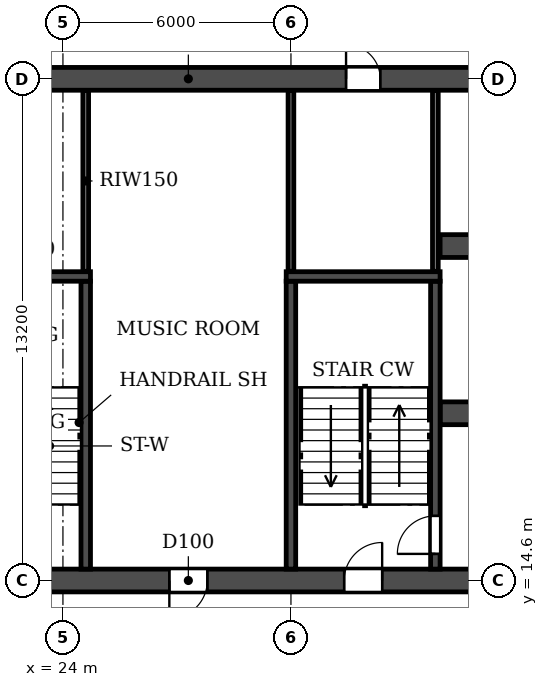
"""IFC4 building model, lengths in metres.
Left out: names, types, materials, properties, quantities, classifications, styles, units other than length and angle.
Written with IfcOpenShell. Run it as: python <this file> out.ifc"""

import sys

from ifc_helpers import new_model, si_unit, direction, frame, frame_2d, origin, place, context, subcontext, project, spatial, rectangle, extrude, element, fill, save


model = new_model("IFC4")
c1 = context("Model", 3, precision=1e-05, world=origin(), true_north=direction((0.0, 1.0)))
c2 = subcontext(c1, "Body", "Model", "MODEL_VIEW")
j1 = project(units=[si_unit("LENGTHUNIT", "METRE"), si_unit("PLANEANGLEUNIT", "RADIAN")], contexts=[c1])
p1 = place(None, origin())
s1 = spatial("IfcSite", under=j1, at=p1, CompositionType="ELEMENT")
p2 = place(p1, origin())
s2 = spatial("IfcBuilding", under=s1, at=p2, CompositionType="ELEMENT")
p3 = place(p2, frame((0.0, 0.0, 56.4)))
s3 = spatial("IfcBuildingStorey", under=s2, at=p3, CompositionType="ELEMENT", Elevation=56.4)
p4 = place(p3, frame((8.6, 14.6, 0.0), z_axis=(0.0, 0.0, 1.0), x_axis=(1.0, 0.0, 0.0)))
e1 = element("IfcWall", 1, at=p4, inside=s3, PredefinedType="SOLIDWALL", context=c2, shape_type="SweptSolid", body=[
    extrude(rectangle(XDim=84.8, YDim=0.6, at=frame_2d((42.4, 0.0))), origin(), (0.0, 0.0, 1.0), 3.05),
])
p5 = place(p4, frame((1.35, 0.0, 0.0)))
e2 = element("IfcOpeningElement", 2, at=p5, cuts=e1, PredefinedType="OPENING", context=c2, shape_type="SweptSolid", body=[
    extrude(rectangle(XDim=1.0, YDim=2.1, at=frame_2d((0.5, 1.05))), frame((0.0, 0.31, 0.0), z_axis=(0.0, -1.0, 0.0), x_axis=(1.0, 0.0, 0.0)), (0.0, 0.0, 1.0), 0.62),
])
p6 = place(p4, frame((6.05, 0.0, 0.0)))
e3 = element("IfcOpeningElement", 3, at=p6, cuts=e1, PredefinedType="OPENING", context=c2, shape_type="SweptSolid", body=[
    extrude(rectangle(XDim=1.0, YDim=2.1, at=frame_2d((0.5, 1.05))), frame((0.0, 0.31, 0.0), z_axis=(0.0, -1.0, 0.0), x_axis=(1.0, 0.0, 0.0)), (0.0, 0.0, 1.0), 0.62),
])
p7 = place(p4, frame((10.3, 0.0, 0.0)))
e4 = element("IfcOpeningElement", 4, at=p7, cuts=e1, PredefinedType="OPENING", context=c2, shape_type="SweptSolid", body=[
    extrude(rectangle(XDim=1.0, YDim=2.1, at=frame_2d((0.5, 1.05))), frame((0.0, 0.31, 0.0), z_axis=(0.0, -1.0, 0.0), x_axis=(1.0, 0.0, 0.0)), (0.0, 0.0, 1.0), 0.62),
])
p8 = place(p4, frame((18.2, 0.0, 0.0)))
e5 = element("IfcOpeningElement", 5, at=p8, cuts=e1, PredefinedType="OPENING", context=c2, shape_type="SweptSolid", body=[
    extrude(rectangle(XDim=1.0, YDim=2.1, at=frame_2d((0.5, 1.05))), frame((0.0, 0.31, 0.0), z_axis=(0.0, -1.0, 0.0), x_axis=(1.0, 0.0, 0.0)), (0.0, 0.0, 1.0), 0.62),
])
p9 = place(p4, frame((22.8, 0.0, 0.0)))
e6 = element("IfcOpeningElement", 6, at=p9, cuts=e1, PredefinedType="OPENING", context=c2, shape_type="SweptSolid", body=[
    extrude(rectangle(XDim=1.0, YDim=2.1, at=frame_2d((0.5, 1.05))), frame((0.0, 0.31, 0.0), z_axis=(0.0, -1.0, 0.0), x_axis=(1.0, 0.0, 0.0)), (0.0, 0.0, 1.0), 0.62),
])
p10 = place(p4, frame((35.4, 0.0, 0.0)))
e7 = element("IfcOpeningElement", 7, at=p10, cuts=e1, PredefinedType="OPENING", context=c2, shape_type="SweptSolid", body=[
    extrude(rectangle(XDim=1.0, YDim=2.1, at=frame_2d((0.5, 1.05))), frame((0.0, 0.31, 0.0), z_axis=(0.0, -1.0, 0.0), x_axis=(1.0, 0.0, 0.0)), (0.0, 0.0, 1.0), 0.62),
])
p11 = place(p4, frame((39.3, 0.0, 0.0)))
e8 = element("IfcOpeningElement", 8, at=p11, cuts=e1, PredefinedType="OPENING", context=c2, shape_type="SweptSolid", body=[
    extrude(rectangle(XDim=1.0, YDim=2.1, at=frame_2d((0.5, 1.05))), frame((0.0, 0.31, 0.0), z_axis=(0.0, -1.0, 0.0), x_axis=(1.0, 0.0, 0.0)), (0.0, 0.0, 1.0), 0.62),
])
p12 = place(p4, frame((41.9, 0.0, 0.0)))
e9 = element("IfcOpeningElement", 9, at=p12, cuts=e1, PredefinedType="OPENING", context=c2, shape_type="SweptSolid", body=[
    extrude(rectangle(XDim=1.0, YDim=2.1, at=frame_2d((0.5, 1.05))), frame((0.0, 0.31, 0.0), z_axis=(0.0, -1.0, 0.0), x_axis=(1.0, 0.0, 0.0)), (0.0, 0.0, 1.0), 0.62),
])
p13 = place(p4, frame((47.1, 0.0, 0.0)))
e10 = element("IfcOpeningElement", 10, at=p13, cuts=e1, PredefinedType="OPENING", context=c2, shape_type="SweptSolid", body=[
    extrude(rectangle(XDim=1.0, YDim=2.1, at=frame_2d((0.5, 1.05))), frame((0.0, 0.31, 0.0), z_axis=(0.0, -1.0, 0.0), x_axis=(1.0, 0.0, 0.0)), (0.0, 0.0, 1.0), 0.62),
])
p14 = place(p4, frame((61.0, 0.0, 0.0)))
e11 = element("IfcOpeningElement", 11, at=p14, cuts=e1, PredefinedType="OPENING", context=c2, shape_type="SweptSolid", body=[
    extrude(rectangle(XDim=1.0, YDim=2.1, at=frame_2d((0.5, 1.05))), frame((0.0, 0.31, 0.0), z_axis=(0.0, -1.0, 0.0), x_axis=(1.0, 0.0, 0.0)), (0.0, 0.0, 1.0), 0.62),
])
p15 = place(p4, frame((65.6, 0.0, 0.0)))
e12 = element("IfcOpeningElement", 12, at=p15, cuts=e1, PredefinedType="OPENING", context=c2, shape_type="SweptSolid", body=[
    extrude(rectangle(XDim=1.0, YDim=2.1, at=frame_2d((0.5, 1.05))), frame((0.0, 0.31, 0.0), z_axis=(0.0, -1.0, 0.0), x_axis=(1.0, 0.0, 0.0)), (0.0, 0.0, 1.0), 0.62),
])
p16 = place(p4, frame((73.5, 0.0, 0.0)))
e13 = element("IfcOpeningElement", 13, at=p16, cuts=e1, PredefinedType="OPENING", context=c2, shape_type="SweptSolid", body=[
    extrude(rectangle(XDim=1.0, YDim=2.1, at=frame_2d((0.5, 1.05))), frame((0.0, 0.31, 0.0), z_axis=(0.0, -1.0, 0.0), x_axis=(1.0, 0.0, 0.0)), (0.0, 0.0, 1.0), 0.62),
])
p17 = place(p4, frame((77.9, 0.0, 0.0)))
e14 = element("IfcOpeningElement", 14, at=p17, cuts=e1, PredefinedType="OPENING", context=c2, shape_type="SweptSolid", body=[
    extrude(rectangle(XDim=1.0, YDim=2.1, at=frame_2d((0.5, 1.05))), frame((0.0, 0.31, 0.0), z_axis=(0.0, -1.0, 0.0), x_axis=(1.0, 0.0, 0.0)), (0.0, 0.0, 1.0), 0.62),
])
p18 = place(p4, frame((82.6, 0.0, 0.0)))
e15 = element("IfcOpeningElement", 15, at=p18, cuts=e1, PredefinedType="OPENING", context=c2, shape_type="SweptSolid", body=[
    extrude(rectangle(XDim=1.0, YDim=2.1, at=frame_2d((0.5, 1.05))), frame((0.0, 0.31, 0.0), z_axis=(0.0, -1.0, 0.0), x_axis=(1.0, 0.0, 0.0)), (0.0, 0.0, 1.0), 0.62),
])
p19 = place(p3, frame((8.6, 27.8, 0.0), z_axis=(0.0, 0.0, 1.0), x_axis=(1.0, 0.0, 0.0)))
e16 = element("IfcWall", 16, at=p19, inside=s3, PredefinedType="SOLIDWALL", context=c2, shape_type="SweptSolid", body=[
    extrude(rectangle(XDim=84.8, YDim=0.6, at=frame_2d((42.4, 0.0))), origin(), (0.0, 0.0, 1.0), 3.05),
])
p20 = place(p19, frame((1.2, 0.0, 0.0)))
e17 = element("IfcOpeningElement", 17, at=p20, cuts=e16, PredefinedType="OPENING", context=c2, shape_type="SweptSolid", body=[
    extrude(rectangle(XDim=1.0, YDim=2.1, at=frame_2d((0.5, 1.05))), frame((0.0, 0.31, 0.0), z_axis=(0.0, -1.0, 0.0), x_axis=(1.0, 0.0, 0.0)), (0.0, 0.0, 1.0), 0.62),
])
p21 = place(p19, frame((5.9, 0.0, 0.0)))
e18 = element("IfcOpeningElement", 18, at=p21, cuts=e16, PredefinedType="OPENING", context=c2, shape_type="SweptSolid", body=[
    extrude(rectangle(XDim=1.0, YDim=2.1, at=frame_2d((0.5, 1.05))), frame((0.0, 0.31, 0.0), z_axis=(0.0, -1.0, 0.0), x_axis=(1.0, 0.0, 0.0)), (0.0, 0.0, 1.0), 0.62),
])
p22 = place(p19, frame((10.3, 0.0, 0.0)))
e19 = element("IfcOpeningElement", 19, at=p22, cuts=e16, PredefinedType="OPENING", context=c2, shape_type="SweptSolid", body=[
    extrude(rectangle(XDim=1.0, YDim=2.1, at=frame_2d((0.5, 1.05))), frame((0.0, 0.31, 0.0), z_axis=(0.0, -1.0, 0.0), x_axis=(1.0, 0.0, 0.0)), (0.0, 0.0, 1.0), 0.62),
])
p23 = place(p19, frame((13.65, 0.0, 0.0)))
e20 = element("IfcOpeningElement", 20, at=p23, cuts=e16, PredefinedType="OPENING", context=c2, shape_type="SweptSolid", body=[
    extrude(rectangle(XDim=0.9, YDim=2.1, at=frame_2d((0.45, 1.05))), frame((0.0, 0.31, 0.0), z_axis=(0.0, -1.0, 0.0), x_axis=(1.0, 0.0, 0.0)), (0.0, 0.0, 1.0), 0.62),
])
p24 = place(p19, frame((22.85, 0.0, 0.0)))
e21 = element("IfcOpeningElement", 21, at=p24, cuts=e16, PredefinedType="OPENING", context=c2, shape_type="SweptSolid", body=[
    extrude(rectangle(XDim=0.9, YDim=2.1, at=frame_2d((0.45, 1.05))), frame((0.0, 0.31, 0.0), z_axis=(0.0, -1.0, 0.0), x_axis=(1.0, 0.0, 0.0)), (0.0, 0.0, 1.0), 0.62),
])
p25 = place(p19, frame((27.3, 0.0, 0.0)))
e22 = element("IfcOpeningElement", 22, at=p25, cuts=e16, PredefinedType="OPENING", context=c2, shape_type="SweptSolid", body=[
    extrude(rectangle(XDim=1.0, YDim=2.1, at=frame_2d((0.5, 1.05))), frame((0.0, 0.31, 0.0), z_axis=(0.0, -1.0, 0.0), x_axis=(1.0, 0.0, 0.0)), (0.0, 0.0, 1.0), 0.62),
])
p26 = place(p19, frame((32.5, 0.0, 0.0)))
e23 = element("IfcOpeningElement", 23, at=p26, cuts=e16, PredefinedType="OPENING", context=c2, shape_type="SweptSolid", body=[
    extrude(rectangle(XDim=1.0, YDim=2.1, at=frame_2d((0.5, 1.05))), frame((0.0, 0.31, 0.0), z_axis=(0.0, -1.0, 0.0), x_axis=(1.0, 0.0, 0.0)), (0.0, 0.0, 1.0), 0.62),
])
p27 = place(p19, frame((39.0, 0.0, 0.0)))
e24 = element("IfcOpeningElement", 24, at=p27, cuts=e16, PredefinedType="OPENING", context=c2, shape_type="SweptSolid", body=[
    extrude(rectangle(XDim=1.0, YDim=2.1, at=frame_2d((0.5, 1.05))), frame((0.0, 0.31, 0.0), z_axis=(0.0, -1.0, 0.0), x_axis=(1.0, 0.0, 0.0)), (0.0, 0.0, 1.0), 0.62),
])
p28 = place(p19, frame((41.9, 0.0, 0.0)))
e25 = element("IfcOpeningElement", 25, at=p28, cuts=e16, PredefinedType="OPENING", context=c2, shape_type="SweptSolid", body=[
    extrude(rectangle(XDim=1.0, YDim=2.1, at=frame_2d((0.5, 1.05))), frame((0.0, 0.31, 0.0), z_axis=(0.0, -1.0, 0.0), x_axis=(1.0, 0.0, 0.0)), (0.0, 0.0, 1.0), 0.62),
])
p29 = place(p19, frame((47.4, 0.0, 0.0)))
e26 = element("IfcOpeningElement", 26, at=p29, cuts=e16, PredefinedType="OPENING", context=c2, shape_type="SweptSolid", body=[
    extrude(rectangle(XDim=1.0, YDim=2.1, at=frame_2d((0.5, 1.05))), frame((0.0, 0.31, 0.0), z_axis=(0.0, -1.0, 0.0), x_axis=(1.0, 0.0, 0.0)), (0.0, 0.0, 1.0), 0.62),
])
p30 = place(p19, frame((53.9, 0.0, 0.0)))
e27 = element("IfcOpeningElement", 27, at=p30, cuts=e16, PredefinedType="OPENING", context=c2, shape_type="SweptSolid", body=[
    extrude(rectangle(XDim=1.0, YDim=2.1, at=frame_2d((0.5, 1.05))), frame((0.0, 0.31, 0.0), z_axis=(0.0, -1.0, 0.0), x_axis=(1.0, 0.0, 0.0)), (0.0, 0.0, 1.0), 0.62),
])
p31 = place(p19, frame((57.8, 0.0, 0.0)))
e28 = element("IfcOpeningElement", 28, at=p31, cuts=e16, PredefinedType="OPENING", context=c2, shape_type="SweptSolid", body=[
    extrude(rectangle(XDim=1.0, YDim=2.1, at=frame_2d((0.5, 1.05))), frame((0.0, 0.31, 0.0), z_axis=(0.0, -1.0, 0.0), x_axis=(1.0, 0.0, 0.0)), (0.0, 0.0, 1.0), 0.62),
])
p32 = place(p19, frame((61.05, 0.0, 0.0)))
e29 = element("IfcOpeningElement", 29, at=p32, cuts=e16, PredefinedType="OPENING", context=c2, shape_type="SweptSolid", body=[
    extrude(rectangle(XDim=0.9, YDim=2.1, at=frame_2d((0.45, 1.05))), frame((0.0, 0.31, 0.0), z_axis=(0.0, -1.0, 0.0), x_axis=(1.0, 0.0, 0.0)), (0.0, 0.0, 1.0), 0.62),
])
p33 = place(p19, frame((70.25, 0.0, 0.0)))
e30 = element("IfcOpeningElement", 30, at=p33, cuts=e16, PredefinedType="OPENING", context=c2, shape_type="SweptSolid", body=[
    extrude(rectangle(XDim=0.9, YDim=2.1, at=frame_2d((0.45, 1.05))), frame((0.0, 0.31, 0.0), z_axis=(0.0, -1.0, 0.0), x_axis=(1.0, 0.0, 0.0)), (0.0, 0.0, 1.0), 0.62),
])
p34 = place(p19, frame((73.5, 0.0, 0.0)))
e31 = element("IfcOpeningElement", 31, at=p34, cuts=e16, PredefinedType="OPENING", context=c2, shape_type="SweptSolid", body=[
    extrude(rectangle(XDim=1.0, YDim=2.1, at=frame_2d((0.5, 1.05))), frame((0.0, 0.31, 0.0), z_axis=(0.0, -1.0, 0.0), x_axis=(1.0, 0.0, 0.0)), (0.0, 0.0, 1.0), 0.62),
])
p35 = place(p19, frame((77.75, 0.0, 0.0)))
e32 = element("IfcOpeningElement", 32, at=p35, cuts=e16, PredefinedType="OPENING", context=c2, shape_type="SweptSolid", body=[
    extrude(rectangle(XDim=1.0, YDim=2.1, at=frame_2d((0.5, 1.05))), frame((0.0, 0.31, 0.0), z_axis=(0.0, -1.0, 0.0), x_axis=(1.0, 0.0, 0.0)), (0.0, 0.0, 1.0), 0.62),
])
p36 = place(p19, frame((82.45, 0.0, 0.0)))
e33 = element("IfcOpeningElement", 33, at=p36, cuts=e16, PredefinedType="OPENING", context=c2, shape_type="SweptSolid", body=[
    extrude(rectangle(XDim=1.0, YDim=2.1, at=frame_2d((0.5, 1.05))), frame((0.0, 0.31, 0.0), z_axis=(0.0, -1.0, 0.0), x_axis=(1.0, 0.0, 0.0)), (0.0, 0.0, 1.0), 0.62),
])
p37 = place(p3, frame((33.925, 19.0, 0.0), z_axis=(0.0, 0.0, 1.0), x_axis=(1.0, 0.0, 0.0)))
e34 = element("IfcWall", 34, at=p37, inside=s3, PredefinedType="SOLIDWALL", context=c2, shape_type="SweptSolid", body=[
    extrude(rectangle(XDim=34.15, YDim=0.6, at=frame_2d((17.075, 0.0))), origin(), (0.0, 0.0, 1.0), 3.05),
])
p38 = place(p37, frame((16.175, 0.0, 0.0)))
e35 = element("IfcOpeningElement", 35, at=p38, cuts=e34, PredefinedType="OPENING", context=c2, shape_type="SweptSolid", body=[
    extrude(rectangle(XDim=1.8, YDim=2.1, at=frame_2d((0.9, 1.05))), frame((0.0, 0.31, 0.0), z_axis=(0.0, -1.0, 0.0), x_axis=(1.0, 0.0, 0.0)), (0.0, 0.0, 1.0), 0.62),
])
p39 = place(p37, frame((1.525, 0.0, 0.0)))
e36 = element("IfcOpeningElement", 36, at=p39, cuts=e34, PredefinedType="OPENING", context=c2, shape_type="SweptSolid", body=[
    extrude(rectangle(XDim=1.8, YDim=2.1, at=frame_2d((0.9, 1.05))), frame((0.0, 0.31, 0.0), z_axis=(0.0, -1.0, 0.0), x_axis=(1.0, 0.0, 0.0)), (0.0, 0.0, 1.0), 0.62),
])
p40 = place(p37, frame((8.725, 0.0, 0.0)))
e37 = element("IfcOpeningElement", 37, at=p40, cuts=e34, PredefinedType="OPENING", context=c2, shape_type="SweptSolid", body=[
    extrude(rectangle(XDim=1.1, YDim=2.1, at=frame_2d((0.55, 1.05))), frame((0.0, 0.31, 0.0), z_axis=(0.0, -1.0, 0.0), x_axis=(1.0, 0.0, 0.0)), (0.0, 0.0, 1.0), 0.62),
])
p41 = place(p37, frame((11.325, 0.0, 0.0)))
e38 = element("IfcOpeningElement", 38, at=p41, cuts=e34, PredefinedType="OPENING", context=c2, shape_type="SweptSolid", body=[
    extrude(rectangle(XDim=1.1, YDim=2.1, at=frame_2d((0.55, 1.05))), frame((0.0, 0.31, 0.0), z_axis=(0.0, -1.0, 0.0), x_axis=(1.0, 0.0, 0.0)), (0.0, 0.0, 1.0), 0.62),
])
p42 = place(p37, frame((13.925, 0.0, 0.0)))
e39 = element("IfcOpeningElement", 39, at=p42, cuts=e34, PredefinedType="OPENING", context=c2, shape_type="SweptSolid", body=[
    extrude(rectangle(XDim=1.1, YDim=2.1, at=frame_2d((0.55, 1.05))), frame((0.0, 0.31, 0.0), z_axis=(0.0, -1.0, 0.0), x_axis=(1.0, 0.0, 0.0)), (0.0, 0.0, 1.0), 0.62),
])
p43 = place(p37, frame((19.125, 0.0, 0.0)))
e40 = element("IfcOpeningElement", 40, at=p43, cuts=e34, PredefinedType="OPENING", context=c2, shape_type="SweptSolid", body=[
    extrude(rectangle(XDim=1.1, YDim=2.1, at=frame_2d((0.55, 1.05))), frame((0.0, 0.31, 0.0), z_axis=(0.0, -1.0, 0.0), x_axis=(1.0, 0.0, 0.0)), (0.0, 0.0, 1.0), 0.62),
])
p44 = place(p37, frame((21.725, 0.0, 0.0)))
e41 = element("IfcOpeningElement", 41, at=p44, cuts=e34, PredefinedType="OPENING", context=c2, shape_type="SweptSolid", body=[
    extrude(rectangle(XDim=1.1, YDim=2.1, at=frame_2d((0.55, 1.05))), frame((0.0, 0.31, 0.0), z_axis=(0.0, -1.0, 0.0), x_axis=(1.0, 0.0, 0.0)), (0.0, 0.0, 1.0), 0.62),
])
p45 = place(p37, frame((24.325, 0.0, 0.0)))
e42 = element("IfcOpeningElement", 42, at=p45, cuts=e34, PredefinedType="OPENING", context=c2, shape_type="SweptSolid", body=[
    extrude(rectangle(XDim=1.1, YDim=2.1, at=frame_2d((0.55, 1.05))), frame((0.0, 0.31, 0.0), z_axis=(0.0, -1.0, 0.0), x_axis=(1.0, 0.0, 0.0)), (0.0, 0.0, 1.0), 0.62),
])
p46 = place(p37, frame((30.825, 0.0, 0.0)))
e43 = element("IfcOpeningElement", 43, at=p46, cuts=e34, PredefinedType="OPENING", context=c2, shape_type="SweptSolid", body=[
    extrude(rectangle(XDim=1.8, YDim=2.1, at=frame_2d((0.9, 1.05))), frame((0.0, 0.31, 0.0), z_axis=(0.0, -1.0, 0.0), x_axis=(1.0, 0.0, 0.0)), (0.0, 0.0, 1.0), 0.62),
])
p47 = place(p3, frame((33.925, 23.4, 0.0), z_axis=(0.0, 0.0, 1.0), x_axis=(1.0, 0.0, 0.0)))
e44 = element("IfcWall", 44, at=p47, inside=s3, PredefinedType="SOLIDWALL", context=c2, shape_type="SweptSolid", body=[
    extrude(rectangle(XDim=34.15, YDim=0.6, at=frame_2d((17.075, 0.0))), origin(), (0.0, 0.0, 1.0), 3.05),
])
p48 = place(p47, frame((16.175, 0.0, 0.0)))
e45 = element("IfcOpeningElement", 45, at=p48, cuts=e44, PredefinedType="OPENING", context=c2, shape_type="SweptSolid", body=[
    extrude(rectangle(XDim=1.8, YDim=2.1, at=frame_2d((0.9, 1.05))), frame((0.0, 0.31, 0.0), z_axis=(0.0, -1.0, 0.0), x_axis=(1.0, 0.0, 0.0)), (0.0, 0.0, 1.0), 0.62),
])
p49 = place(p47, frame((11.025, 0.0, 0.0)))
e46 = element("IfcOpeningElement", 46, at=p49, cuts=e44, PredefinedType="OPENING", context=c2, shape_type="SweptSolid", body=[
    extrude(rectangle(XDim=1.1, YDim=2.1, at=frame_2d((0.55, 1.05))), frame((0.0, 0.31, 0.0), z_axis=(0.0, -1.0, 0.0), x_axis=(1.0, 0.0, 0.0)), (0.0, 0.0, 1.0), 0.62),
])
p50 = place(p3, frame((30.0, 14.9, 0.0), z_axis=(0.0, 0.0, 1.0), x_axis=(0.0, 1.0, 0.0)))
e47 = element("IfcWall", 47, at=p50, inside=s3, PredefinedType="SOLIDWALL", context=c2, shape_type="SweptSolid", body=[
    extrude(rectangle(XDim=7.575, YDim=0.25, at=frame_2d((3.788, 0.0))), origin(), (0.0, 0.0, 1.0), 3.05),
])
p51 = place(p3, frame((33.8, 14.9, 0.0), z_axis=(0.0, 0.0, 1.0), x_axis=(0.0, 1.0, 0.0)))
e48 = element("IfcWall", 48, at=p51, inside=s3, PredefinedType="SOLIDWALL", context=c2, shape_type="SweptSolid", body=[
    extrude(rectangle(XDim=7.575, YDim=0.25, at=frame_2d((3.788, 0.0))), origin(), (0.0, 0.0, 1.0), 3.05),
])
p52 = place(p51, frame((0.4, 0.0, 0.0)))
e49 = element("IfcOpeningElement", 49, at=p52, cuts=e48, PredefinedType="OPENING", context=c2, shape_type="SweptSolid", body=[
    extrude(rectangle(XDim=1.0, YDim=2.1, at=frame_2d((0.5, 1.05))), frame((0.0, 0.135, 0.0), z_axis=(0.0, -1.0, 0.0), x_axis=(1.0, 0.0, 0.0)), (0.0, 0.0, 1.0), 0.27),
])
p53 = place(p3, frame((29.875, 22.6, 0.0), z_axis=(0.0, 0.0, 1.0), x_axis=(1.0, 0.0, 0.0)))
e50 = element("IfcWall", 50, at=p53, inside=s3, PredefinedType="SOLIDWALL", context=c2, shape_type="SweptSolid", body=[
    extrude(rectangle(XDim=4.05, YDim=0.25, at=frame_2d((2.025, 0.0))), origin(), (0.0, 0.0, 1.0), 3.05),
])
p54 = place(p3, frame((24.6, 14.9, 0.0), z_axis=(0.0, 0.0, 1.0), x_axis=(0.0, 1.0, 0.0)))
e51 = element("IfcWall", 51, at=p54, inside=s3, PredefinedType="SOLIDWALL", context=c2, shape_type="SweptSolid", body=[
    extrude(rectangle(XDim=7.575, YDim=0.25, at=frame_2d((3.788, 0.0))), origin(), (0.0, 0.0, 1.0), 3.05),
])
p55 = place(p3, frame((20.675, 22.6, 0.0), z_axis=(0.0, 0.0, 1.0), x_axis=(1.0, 0.0, 0.0)))
e52 = element("IfcWall", 52, at=p55, inside=s3, PredefinedType="SOLIDWALL", context=c2, shape_type="SweptSolid", body=[
    extrude(rectangle(XDim=4.05, YDim=0.25, at=frame_2d((2.025, 0.0))), origin(), (0.0, 0.0, 1.0), 3.05),
])
for number, where, z_axis, x_axis in (
    (53, (24.6, 22.735, 0.0), (0.0, 0.0, 1.0), (0.0, 1.0, 0.0)),
    (54, (30.0, 22.735, 0.0), (0.0, 0.0, 1.0), (0.0, 1.0, 0.0)),
    (55, (33.8, 22.735, 0.0), (0.0, 0.0, 1.0), (0.0, 1.0, 0.0)),
):
    element("IfcWall", number, at=place(p3, frame(where, z_axis=z_axis, x_axis=x_axis)), inside=s3, PredefinedType="PARTITIONING", context=c2, shape_type="SweptSolid", body=[
        extrude(rectangle(XDim=4.755, YDim=0.15, at=frame_2d((2.377, 0.0))), origin(), (0.0, 0.0, 1.0), 3.05),
    ])
p56 = place(p24, origin())
e56 = element("IfcDoor", 56, at=p56, inside=s3, OperationType="SINGLE_SWING_LEFT", PredefinedType="DOOR", context=c2, shape_type="SweptSolid", body=[
    extrude(rectangle(XDim=0.9, YDim=2.1, at=frame_2d((0.45, 1.05))), frame((0.0, 0.025, 0.0), z_axis=(0.0, -1.0, 0.0), x_axis=(1.0, 0.0, 0.0)), (0.0, 0.0, 1.0), 0.05),
])
fill(e21, e56)
p57 = place(p8, frame((1.0, 0.0, 0.0), z_axis=(0.0, 0.0, 1.0), x_axis=(-1.0, 0.0, 0.0)))
e57 = element("IfcDoor", 57, at=p57, inside=s3, OperationType="SINGLE_SWING_RIGHT", PredefinedType="DOOR", context=c2, shape_type="SweptSolid", body=[
    extrude(rectangle(XDim=1.0, YDim=2.1, at=frame_2d((0.5, 1.05))), frame((0.0, 0.025, 0.0), z_axis=(0.0, -1.0, 0.0), x_axis=(1.0, 0.0, 0.0)), (0.0, 0.0, 1.0), 0.05),
])
fill(e5, e57)
p58 = place(p9, origin())
e58 = element("IfcDoor", 58, at=p58, inside=s3, OperationType="SINGLE_SWING_RIGHT", PredefinedType="DOOR", context=c2, shape_type="SweptSolid", body=[
    extrude(rectangle(XDim=1.0, YDim=2.1, at=frame_2d((0.5, 1.05))), frame((0.0, 0.025, 0.0), z_axis=(0.0, -1.0, 0.0), x_axis=(1.0, 0.0, 0.0)), (0.0, 0.0, 1.0), 0.05),
])
fill(e6, e58)
p59 = place(p52, origin())
e59 = element("IfcDoor", 59, at=p59, inside=s3, OperationType="SINGLE_SWING_LEFT", PredefinedType="DOOR", context=c2, shape_type="SweptSolid", body=[
    extrude(rectangle(XDim=1.0, YDim=2.1, at=frame_2d((0.5, 1.05))), frame((0.0, 0.025, 0.0), z_axis=(0.0, -1.0, 0.0), x_axis=(1.0, 0.0, 0.0)), (0.0, 0.0, 1.0), 0.05),
])
fill(e49, e59)
save(model, sys.argv[1])
